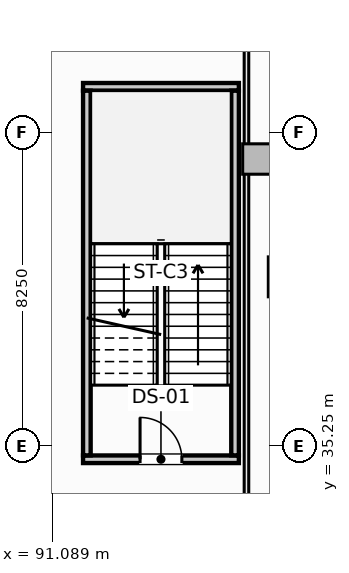
"""IFC4 building model, lengths in metres.
Left out: names, types, materials, properties, quantities, classifications, styles, units other than length and angle.
Written with IfcOpenShell. Run it as: python <this file> out.ifc"""

import sys

from ifc_helpers import new_model, si_unit, direction, frame, frame_2d, origin, origin_2d, place, context, subcontext, project, spatial, rectangle, extrude, element, fill, save


model = new_model("IFC4")
c1 = context("Model", 3, precision=1e-05, world=origin(), true_north=direction((0.0, 1.0)))
c2 = subcontext(c1, "Body", "Model", "MODEL_VIEW")
j1 = project(units=[si_unit("LENGTHUNIT", "METRE"), si_unit("PLANEANGLEUNIT", "RADIAN")], contexts=[c1])
p1 = place(None, origin())
s1 = spatial("IfcSite", under=j1, at=p1, CompositionType="ELEMENT")
p2 = place(p1, origin())
s2 = spatial("IfcBuilding", under=s1, at=p2, CompositionType="ELEMENT")
p3 = place(p2, frame((0.0, 0.0, -13.5)))
s3 = spatial("IfcBuildingStorey", under=s2, at=p3, CompositionType="ELEMENT", Elevation=-13.5)
p4 = place(p3, frame((97.3, 39.7, -0.5), z_axis=(0.0, 0.0, 1.0), x_axis=(1.0, 0.0, 0.0)))
e1 = element("IfcColumn", 1, at=p4, inside=s3, PredefinedType="COLUMN", context=c2, shape_type="SweptSolid", body=[
    extrude(rectangle(XDim=1.05, YDim=1.05, at=origin_2d()), origin(), (0.0, 0.0, 1.0), 4.68),
])
p5 = place(p3, frame((96.5, 42.8, -0.5), z_axis=(0.0, 0.0, 1.0), x_axis=(1.0, 0.0, 0.0)))
e2 = element("IfcColumn", 2, at=p5, inside=s3, PredefinedType="PILASTER", context=c2, shape_type="SweptSolid", body=[
    extrude(rectangle(XDim=0.8, YDim=0.8, at=origin_2d()), origin(), (0.0, 0.0, 1.0), 4.68),
])
p6 = place(p3, frame((91.9, 34.9, -0.5), z_axis=(0.0, 0.0, 1.0), x_axis=(1.0, 0.0, 0.0)))
e3 = element("IfcWall", 3, at=p6, inside=s3, PredefinedType="SHEAR", context=c2, shape_type="SweptSolid", body=[
    extrude(rectangle(XDim=4.1, YDim=0.2, at=frame_2d((2.05, 0.0))), origin(), (0.0, 0.0, 1.0), 4.68),
])
p7 = place(p6, frame((1.5, 0.0, 0.5)))
e4 = element("IfcOpeningElement", 4, at=p7, cuts=e3, PredefinedType="OPENING", context=c2, shape_type="SweptSolid", body=[
    extrude(rectangle(XDim=1.1, YDim=2.15, at=frame_2d((0.55, 1.075))), frame((0.0, 0.11, 0.0), z_axis=(0.0, -1.0, 0.0), x_axis=(1.0, 0.0, 0.0)), (0.0, 0.0, 1.0), 0.22),
])
p8 = place(p3, frame((91.9, 44.7, -0.5), z_axis=(0.0, 0.0, 1.0), x_axis=(1.0, 0.0, 0.0)))
e5 = element("IfcWall", 5, at=p8, inside=s3, PredefinedType="SHEAR", context=c2, shape_type="SweptSolid", body=[
    extrude(rectangle(XDim=4.1, YDim=0.2, at=frame_2d((2.05, 0.0))), origin(), (0.0, 0.0, 1.0), 4.68),
])
for number, where, z_axis, x_axis in (
    (6, (92.0, 35.002, -0.5), (0.0, 0.0, 1.0), (0.0, 1.0, 0.0)),
    (7, (95.9, 35.002, -0.5), (0.0, 0.0, 1.0), (0.0, 1.0, 0.0)),
):
    element("IfcWall", number, at=place(p3, frame(where, z_axis=z_axis, x_axis=x_axis)), inside=s3, PredefinedType="SHEAR", context=c2, shape_type="SweptSolid", body=[
        extrude(rectangle(XDim=9.596, YDim=0.2, at=frame_2d((4.798, 0.0))), origin(), (0.0, 0.0, 1.0), 4.68),
    ])
p9 = place(p3, frame((96.2, 6.612, 0.0), z_axis=(0.0, 0.0, 1.0), x_axis=(0.0, 1.0, 0.0)))
e8 = element("IfcWall", 8, at=p9, inside=s3, PredefinedType="PARTITIONING", context=c2, shape_type="SweptSolid", body=[
    extrude(rectangle(XDim=39.976, YDim=0.12, at=frame_2d((19.988, 0.0))), origin(), (0.0, 0.0, 1.0), 4.18),
])
p10 = place(p7, origin())
e9 = element("IfcDoor", 9, at=p10, inside=s3, OperationType="SINGLE_SWING_LEFT", PredefinedType="DOOR", context=c2, shape_type="SweptSolid", body=[
    extrude(rectangle(XDim=1.1, YDim=2.15, at=frame_2d((0.55, 1.075))), frame((0.0, 0.025, 0.0), z_axis=(0.0, -1.0, 0.0), x_axis=(1.0, 0.0, 0.0)), (0.0, 0.0, 1.0), 0.05),
])
fill(e4, e9)
save(model, sys.argv[1])
